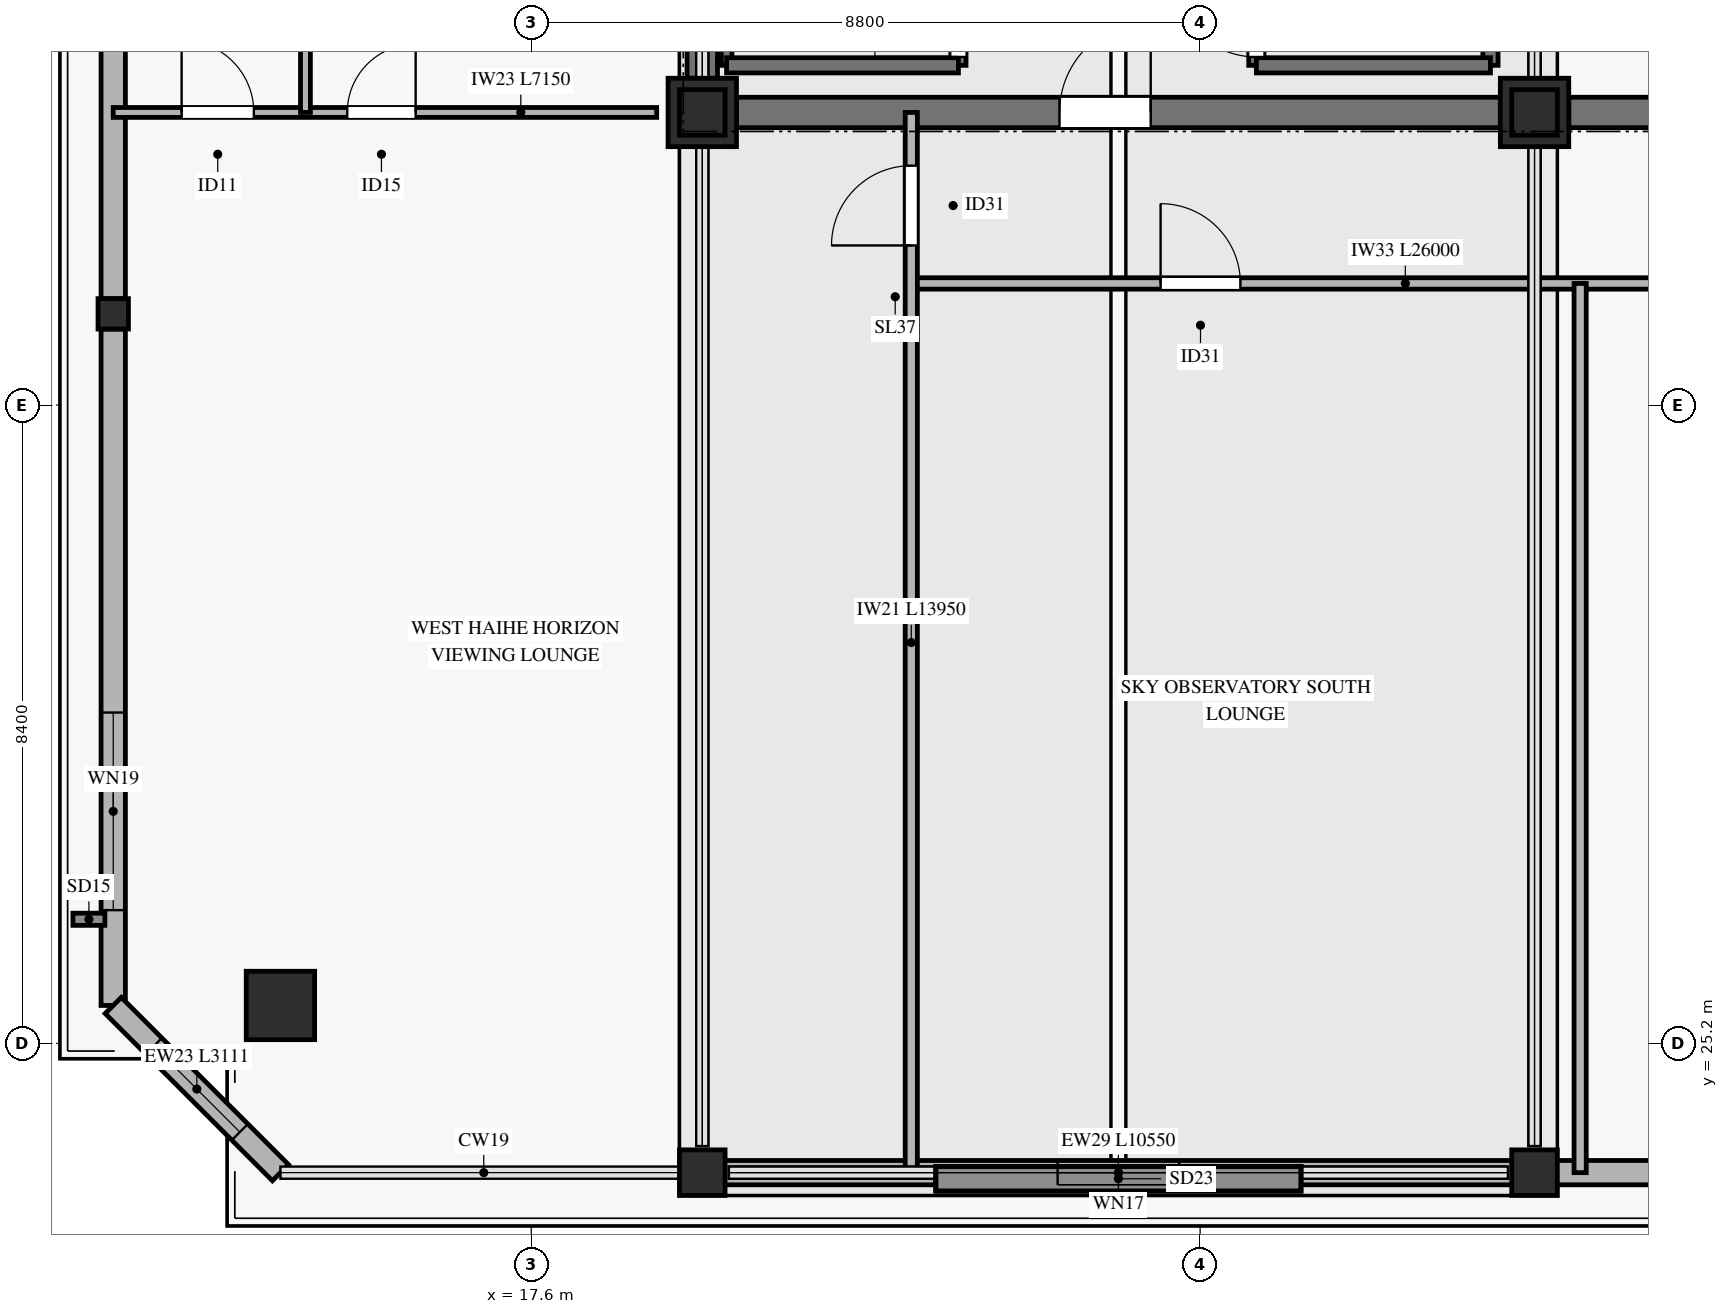
"""IFC4 building model, lengths in metres.
Left out: names, types, materials, properties, quantities, classifications, styles, units other than length and angle.
Written with IfcOpenShell. Run it as: python <this file> out.ifc"""

import sys

from ifc_helpers import new_model, si_unit, direction, frame, frame_2d, origin, origin_2d, place, context, subcontext, project, spatial, rectangle, hollow_rectangle, extrude, source, transform, mapped, element, fill, save


model = new_model("IFC4")
c1 = context("Model", 3, precision=1e-05, world=origin(), true_north=direction((0.0, 1.0)))
c2 = subcontext(c1, "Body", "Model", "MODEL_VIEW")
j1 = project(units=[si_unit("LENGTHUNIT", "METRE"), si_unit("PLANEANGLEUNIT", "RADIAN")], contexts=[c1])
p1 = place(None, origin())
s1 = spatial("IfcSite", under=j1, at=p1, CompositionType="ELEMENT")
p2 = place(p1, origin())
s2 = spatial("IfcBuilding", under=s1, at=p2, CompositionType="ELEMENT")
p3 = place(p2, frame((0.0, 0.0, 352.7)))
s3 = spatial("IfcBuildingStorey", under=s2, at=p3, CompositionType="ELEMENT", Elevation=352.7)
m1 = source(origin(), c2, "Body", "SweptSolid", [
    extrude(rectangle(XDim=0.9, YDim=0.9, at=origin_2d()), origin(), (0.0, 0.0, 1.0), 6.16),
])
for number, where, z_axis, x_axis in (
    (1, (19.85, 37.45, 0.0), (0.0, 0.0, 1.0), (1.0, 0.0, 0.0)),
    (2, (30.8, 37.45, 0.0), (0.0, 0.0, 1.0), (1.0, 0.0, 0.0)),
):
    element("IfcColumn", number, at=place(p3, frame(where, z_axis=z_axis, x_axis=x_axis)), inside=s3, PredefinedType="PILASTER", context=c2, shape_type="MappedRepresentation", body=[
        mapped(m1, transform((0.0, 0.0, 0.0), x_axis=(1.0, 0.0, 0.0), y_axis=(0.0, 1.0, 0.0), z_axis=(0.0, 0.0, 1.0), scale=1.0)),
    ])
p4 = place(p3, frame((20.3, 37.45, 0.0), z_axis=(0.0, 0.0, 1.0), x_axis=(1.0, 0.0, 0.0)))
e3 = element("IfcWall", 3, at=p4, inside=s3, PredefinedType="SHEAR", context=c2, shape_type="SweptSolid", body=[
    extrude(rectangle(XDim=10.05, YDim=0.4, at=frame_2d((5.025, 0.0))), origin(), (0.0, 0.0, 1.0), 6.16),
])
p5 = place(p4, frame((4.25, 0.0, 0.0)))
e4 = element("IfcOpeningElement", 4, at=p5, cuts=e3, PredefinedType="OPENING", context=c2, shape_type="SweptSolid", body=[
    extrude(rectangle(XDim=1.2, YDim=2.15, at=frame_2d((0.6, 1.075))), frame((0.0, 0.21, 0.0), z_axis=(0.0, -1.0, 0.0), x_axis=(1.0, 0.0, 0.0)), (0.0, 0.0, 1.0), 0.42),
])
p6 = place(p3, frame((31.25, 37.45, 0.0), z_axis=(0.0, 0.0, 1.0), x_axis=(1.0, 0.0, 0.0)))
e5 = element("IfcWall", 5, at=p6, inside=s3, PredefinedType="SHEAR", context=c2, shape_type="SweptSolid", body=[
    extrude(rectangle(XDim=1.9, YDim=0.4, at=frame_2d((0.95, 0.0))), origin(), (0.0, 0.0, 1.0), 6.16),
])
p7 = place(p3, frame((19.85, 37.9, 0.0), z_axis=(0.0, 0.0, 1.0), x_axis=(0.0, 1.0, 0.0)))
e6 = element("IfcWall", 6, at=p7, inside=s3, PredefinedType="SHEAR", context=c2, shape_type="SweptSolid", body=[
    extrude(rectangle(XDim=8.2, YDim=0.4, at=frame_2d((4.1, 0.0))), origin(), (0.0, 0.0, 1.0), 6.16),
])
m2 = source(origin(), c2, "Body", "SweptSolid", [
    extrude(hollow_rectangle(XDim=0.9, YDim=0.9, WallThickness=0.04, at=origin_2d()), origin(), (0.0, 0.0, 1.0), 6.16),
])
p8 = place(p3, frame((14.3, 25.7, 0.0), z_axis=(0.0, 0.0, 1.0), x_axis=(1.0, 0.0, 0.0)))
e7 = element("IfcColumn", 7, at=p8, inside=s3, PredefinedType="COLUMN", context=c2, shape_type="MappedRepresentation", body=[
    mapped(m2, transform((0.0, 0.0, 0.0), x_axis=(1.0, 0.0, 0.0), y_axis=(0.0, 1.0, 0.0), z_axis=(0.0, 0.0, 1.0), scale=1.0)),
])
m3 = source(origin(), c2, "Body", "SweptSolid", [
    extrude(hollow_rectangle(XDim=0.4, YDim=0.4, WallThickness=0.02, at=origin_2d()), origin(), (0.0, 0.0, 1.0), 6.16),
])
for number, where, z_axis, x_axis in (
    (8, (19.85, 23.5, 0.0), (0.0, 0.0, 1.0), (1.0, 0.0, 0.0)),
    (9, (30.8, 23.5, 0.0), (0.0, 0.0, 1.0), (1.0, 0.0, 0.0)),
    (10, (12.1, 34.8, 0.0), (0.0, 0.0, 1.0), (1.0, 0.0, 0.0)),
):
    element("IfcColumn", number, at=place(p3, frame(where, z_axis=z_axis, x_axis=x_axis)), inside=s3, PredefinedType="COLUMN", context=c2, shape_type="MappedRepresentation", body=[
        mapped(m3, transform((0.0, 0.0, 0.0), x_axis=(1.0, 0.0, 0.0), y_axis=(0.0, 1.0, 0.0), z_axis=(0.0, 0.0, 1.0), scale=1.0)),
    ])
m4 = source(origin(), c2, "Body", "SweptSolid", [
    extrude(hollow_rectangle(XDim=0.6, YDim=0.6, WallThickness=0.028, at=origin_2d()), origin(), (0.0, 0.0, 1.0), 21.147),
])
for number, where, z_axis, x_axis in (
    (11, (19.85, 23.5, 6.4), (0.0, 0.0, 1.0), (1.0, 0.0, 0.0)),
    (12, (30.8, 23.5, 6.4), (0.0, 0.0, 1.0), (1.0, 0.0, 0.0)),
    (13, (30.8, 37.45, 6.4), (0.0, 0.0, 1.0), (1.0, 0.0, 0.0)),
    (14, (19.85, 37.45, 6.4), (0.0, 0.0, 1.0), (1.0, 0.0, 0.0)),
):
    element("IfcColumn", number, at=place(p3, frame(where, z_axis=z_axis, x_axis=x_axis)), inside=s3, PredefinedType="COLUMN", context=c2, shape_type="MappedRepresentation", body=[
        mapped(m4, transform((0.0, 0.0, 0.0), x_axis=(1.0, 0.0, 0.0), y_axis=(0.0, 1.0, 0.0), z_axis=(0.0, 0.0, 1.0), scale=1.0)),
    ])
p9 = place(p3, frame((20.05, 23.5, 0.0), z_axis=(0.0, 0.0, 1.0), x_axis=(1.0, 0.0, 0.0)))
e15 = element("IfcWall", 15, at=p9, inside=s3, PredefinedType="SOLIDWALL", context=c2, shape_type="SweptSolid", body=[
    extrude(rectangle(XDim=10.55, YDim=0.32, at=frame_2d((5.275, 0.0))), origin(), (0.0, 0.0, 1.0), 5.79),
])
p10 = place(p9, frame((4.475, 0.0, 0.45)))
e16 = element("IfcOpeningElement", 16, at=p10, cuts=e15, PredefinedType="OPENING", context=c2, shape_type="SweptSolid", body=[
    extrude(rectangle(XDim=1.6, YDim=2.0, at=frame_2d((0.8, 1.0))), frame((0.0, 0.17, 0.0), z_axis=(0.0, -1.0, 0.0), x_axis=(1.0, 0.0, 0.0)), (0.0, 0.0, 1.0), 0.34),
])
p11 = place(p3, frame((31.0, 23.5, 0.0), z_axis=(0.0, 0.0, 1.0), x_axis=(1.0, 0.0, 0.0)))
e17 = element("IfcWall", 17, at=p11, inside=s3, PredefinedType="SOLIDWALL", context=c2, shape_type="SweptSolid", body=[
    extrude(rectangle(XDim=6.35, YDim=0.32, at=frame_2d((3.175, 0.0))), origin(), (0.0, 0.0, 1.0), 3.535),
])
p12 = place(p3, frame((12.1, 25.7, 0.0), z_axis=(0.0, 0.0, 1.0), x_axis=(0.0, 1.0, 0.0)))
e18 = element("IfcWall", 18, at=p12, inside=s3, PredefinedType="SOLIDWALL", context=c2, shape_type="SweptSolid", body=[
    extrude(rectangle(XDim=8.9, YDim=0.32, at=frame_2d((4.45, 0.0))), origin(), (0.0, 0.0, 1.0), 5.79),
])
p13 = place(p12, frame((1.254, 0.0, 0.45)))
e19 = element("IfcOpeningElement", 19, at=p13, cuts=e18, PredefinedType="OPENING", context=c2, shape_type="SweptSolid", body=[
    extrude(rectangle(XDim=2.6, YDim=2.4, at=frame_2d((1.3, 1.2))), frame((0.0, 0.17, 0.0), z_axis=(0.0, -1.0, 0.0), x_axis=(1.0, 0.0, 0.0)), (0.0, 0.0, 1.0), 0.34),
])
p14 = place(p3, frame((12.1, 35.0, 0.0), z_axis=(0.0, 0.0, 1.0), x_axis=(0.0, 1.0, 0.0)))
e20 = element("IfcWall", 20, at=p14, inside=s3, PredefinedType="SOLIDWALL", context=c2, shape_type="SweptSolid", body=[
    extrude(rectangle(XDim=8.9, YDim=0.32, at=frame_2d((4.45, 0.0))), origin(), (0.0, 0.0, 1.0), 5.79),
])
p15 = place(p3, frame((12.1, 25.7, 0.0), z_axis=(0.0, 0.0, 1.0), x_axis=(0.707106781187, -0.707106781187, 0.0)))
e21 = element("IfcWall", 21, at=p15, inside=s3, PredefinedType="SOLIDWALL", context=c2, shape_type="SweptSolid", body=[
    extrude(rectangle(XDim=3.111, YDim=0.3, at=frame_2d((1.556, 0.0))), origin(), (0.0, 0.0, 1.0), 5.79),
])
p16 = place(p15, frame((0.756, 0.0, 0.45)))
e22 = element("IfcOpeningElement", 22, at=p16, cuts=e21, PredefinedType="OPENING", context=c2, shape_type="SweptSolid", body=[
    extrude(rectangle(XDim=1.6, YDim=2.0, at=frame_2d((0.8, 1.0))), frame((0.0, 0.16, 0.0), z_axis=(0.0, -1.0, 0.0), x_axis=(1.0, 0.0, 0.0)), (0.0, 0.0, 1.0), 0.32),
])
p17 = place(p3, frame((20.17, 38.07, 0.0), z_axis=(0.0, 0.0, 1.0), x_axis=(0.0, 1.0, 0.0)))
e23 = element("IfcWall", 23, at=p17, inside=s3, PredefinedType="SOLIDWALL", context=c2, shape_type="SweptSolid", body=[
    extrude(rectangle(XDim=7.25, YDim=0.14, at=frame_2d((3.625, 0.0))), origin(), (0.0, 0.0, 1.0), 6.4),
])
p18 = place(p3, frame((23.22, 38.07, 0.0), z_axis=(0.0, 0.0, 1.0), x_axis=(0.0, 1.0, 0.0)))
e24 = element("IfcWall", 24, at=p18, inside=s3, PredefinedType="SOLIDWALL", context=c2, shape_type="SweptSolid", body=[
    extrude(rectangle(XDim=7.25, YDim=0.2, at=frame_2d((3.625, 0.0))), origin(), (0.0, 0.0, 1.0), 6.4),
])
p19 = place(p18, frame((0.11, 0.0, 0.0)))
e25 = element("IfcOpeningElement", 25, at=p19, cuts=e24, PredefinedType="OPENING", context=c2, shape_type="SweptSolid", body=[
    extrude(rectangle(XDim=1.1, YDim=2.15, at=frame_2d((0.55, 1.075))), frame((0.0, 0.11, 0.0), z_axis=(0.0, -1.0, 0.0), x_axis=(1.0, 0.0, 0.0)), (0.0, 0.0, 1.0), 0.22),
])
p20 = place(p3, frame((20.17, 38.07, 0.0), z_axis=(0.0, 0.0, 1.0), x_axis=(1.0, 0.0, 0.0)))
e26 = element("IfcWall", 26, at=p20, inside=s3, PredefinedType="SOLIDWALL", context=c2, shape_type="SweptSolid", body=[
    extrude(rectangle(XDim=3.05, YDim=0.2, at=frame_2d((1.525, 0.0))), origin(), (0.0, 0.0, 1.0), 6.4),
])
p21 = place(p3, frame((27.14, 38.07, 0.0), z_axis=(0.0, 0.0, 1.0), x_axis=(0.0, 1.0, 0.0)))
e27 = element("IfcWall", 27, at=p21, inside=s3, PredefinedType="SOLIDWALL", context=c2, shape_type="SweptSolid", body=[
    extrude(rectangle(XDim=7.25, YDim=0.2, at=frame_2d((3.625, 0.0))), origin(), (0.0, 0.0, 1.0), 6.4),
])
p22 = place(p21, frame((0.11, 0.0, 0.0)))
e28 = element("IfcOpeningElement", 28, at=p22, cuts=e27, PredefinedType="OPENING", context=c2, shape_type="SweptSolid", body=[
    extrude(rectangle(XDim=1.1, YDim=2.15, at=frame_2d((0.55, 1.075))), frame((0.0, 0.11, 0.0), z_axis=(0.0, -1.0, 0.0), x_axis=(1.0, 0.0, 0.0)), (0.0, 0.0, 1.0), 0.22),
])
p23 = place(p3, frame((30.22, 38.07, 0.0), z_axis=(0.0, 0.0, 1.0), x_axis=(0.0, 1.0, 0.0)))
e29 = element("IfcWall", 29, at=p23, inside=s3, PredefinedType="SOLIDWALL", context=c2, shape_type="SweptSolid", body=[
    extrude(rectangle(XDim=7.25, YDim=0.2, at=frame_2d((3.625, 0.0))), origin(), (0.0, 0.0, 1.0), 6.4),
])
p24 = place(p3, frame((27.14, 38.07, 0.0), z_axis=(0.0, 0.0, 1.0), x_axis=(1.0, 0.0, 0.0)))
e30 = element("IfcWall", 30, at=p24, inside=s3, PredefinedType="SOLIDWALL", context=c2, shape_type="SweptSolid", body=[
    extrude(rectangle(XDim=3.08, YDim=0.2, at=frame_2d((1.54, 0.0))), origin(), (0.0, 0.0, 1.0), 6.4),
])
p25 = place(p3, frame((22.6, 35.2, 0.0), z_axis=(0.0, 0.0, 1.0), x_axis=(1.0, 0.0, 0.0)))
e31 = element("IfcWall", 31, at=p25, inside=s3, PredefinedType="PARTITIONING", context=c2, shape_type="SweptSolid", body=[
    extrude(rectangle(XDim=26.0, YDim=0.15, at=frame_2d((13.0, 0.0))), origin(), (0.0, 0.0, 1.0), 3.535),
])
p26 = place(p25, frame((3.28, 0.0, 0.0)))
e32 = element("IfcOpeningElement", 32, at=p26, cuts=e31, PredefinedType="OPENING", context=c2, shape_type="SweptSolid", body=[
    extrude(rectangle(XDim=1.05, YDim=2.15, at=frame_2d((0.525, 1.075))), frame((0.0, 0.085, 0.0), z_axis=(0.0, -1.0, 0.0), x_axis=(1.0, 0.0, 0.0)), (0.0, 0.0, 1.0), 0.17),
])
p27 = place(p25, frame((11.94, 0.0, 0.0)))
e33 = element("IfcOpeningElement", 33, at=p27, cuts=e31, PredefinedType="OPENING", context=c2, shape_type="SweptSolid", body=[
    extrude(rectangle(XDim=1.05, YDim=2.15, at=frame_2d((0.525, 1.075))), frame((0.0, 0.085, 0.0), z_axis=(0.0, -1.0, 0.0), x_axis=(1.0, 0.0, 0.0)), (0.0, 0.0, 1.0), 0.17),
])
p28 = place(p25, frame((19.08, 0.0, 0.0)))
e34 = element("IfcOpeningElement", 34, at=p28, cuts=e31, PredefinedType="OPENING", context=c2, shape_type="SweptSolid", body=[
    extrude(rectangle(XDim=1.05, YDim=2.15, at=frame_2d((0.525, 1.075))), frame((0.0, 0.085, 0.0), z_axis=(0.0, -1.0, 0.0), x_axis=(1.0, 0.0, 0.0)), (0.0, 0.0, 1.0), 0.17),
])
p29 = place(p25, frame((23.6, 0.0, 0.0)))
e35 = element("IfcOpeningElement", 35, at=p29, cuts=e31, PredefinedType="OPENING", context=c2, shape_type="SweptSolid", body=[
    extrude(rectangle(XDim=1.05, YDim=2.15, at=frame_2d((0.525, 1.075))), frame((0.0, 0.085, 0.0), z_axis=(0.0, -1.0, 0.0), x_axis=(1.0, 0.0, 0.0)), (0.0, 0.0, 1.0), 0.17),
])
p30 = place(p3, frame((22.6, 23.5, 0.0), z_axis=(0.0, 0.0, 1.0), x_axis=(0.0, 1.0, 0.0)))
e36 = element("IfcWall", 36, at=p30, inside=s3, PredefinedType="PARTITIONING", context=c2, shape_type="SweptSolid", body=[
    extrude(rectangle(XDim=13.95, YDim=0.16, at=frame_2d((6.975, 0.0))), origin(), (0.0, 0.0, 1.0), 5.745),
])
p31 = place(p30, frame((12.2, 0.0, 0.0)))
e37 = element("IfcOpeningElement", 37, at=p31, cuts=e36, PredefinedType="OPENING", context=c2, shape_type="SweptSolid", body=[
    extrude(rectangle(XDim=1.05, YDim=2.15, at=frame_2d((0.525, 1.075))), frame((0.0, 0.09, 0.0), z_axis=(0.0, -1.0, 0.0), x_axis=(1.0, 0.0, 0.0)), (0.0, 0.0, 1.0), 0.18),
])
p32 = place(p3, frame((31.4, 23.5, 0.0), z_axis=(0.0, 0.0, 1.0), x_axis=(0.0, 1.0, 0.0)))
e38 = element("IfcWall", 38, at=p32, inside=s3, PredefinedType="PARTITIONING", context=c2, shape_type="SweptSolid", body=[
    extrude(rectangle(XDim=11.7, YDim=0.16, at=frame_2d((5.85, 0.0))), origin(), (0.0, 0.0, 1.0), 3.535),
])
p33 = place(p3, frame((12.1, 37.45, 0.0), z_axis=(0.0, 0.0, 1.0), x_axis=(1.0, 0.0, 0.0)))
e39 = element("IfcWall", 39, at=p33, inside=s3, PredefinedType="PARTITIONING", context=c2, shape_type="SweptSolid", body=[
    extrude(rectangle(XDim=7.15, YDim=0.13, at=frame_2d((3.575, 0.0))), origin(), (0.0, 0.0, 1.0), 5.795),
])
p34 = place(p33, frame((0.9, 0.0, 0.0)))
e40 = element("IfcOpeningElement", 40, at=p34, cuts=e39, PredefinedType="OPENING", context=c2, shape_type="SweptSolid", body=[
    extrude(rectangle(XDim=0.95, YDim=2.1, at=frame_2d((0.475, 1.05))), frame((0.0, 0.075, 0.0), z_axis=(0.0, -1.0, 0.0), x_axis=(1.0, 0.0, 0.0)), (0.0, 0.0, 1.0), 0.15),
])
p35 = place(p33, frame((3.079, 0.0, 0.0)))
e41 = element("IfcOpeningElement", 41, at=p35, cuts=e39, PredefinedType="OPENING", context=c2, shape_type="SweptSolid", body=[
    extrude(rectangle(XDim=0.9, YDim=2.1, at=frame_2d((0.45, 1.05))), frame((0.0, 0.075, 0.0), z_axis=(0.0, -1.0, 0.0), x_axis=(1.0, 0.0, 0.0)), (0.0, 0.0, 1.0), 0.15),
])
p36 = place(p3, frame((14.629, 37.45, 0.0), z_axis=(0.0, 0.0, 1.0), x_axis=(0.0, 1.0, 0.0)))
e42 = element("IfcWall", 42, at=p36, inside=s3, PredefinedType="PARTITIONING", context=c2, shape_type="SweptSolid", body=[
    extrude(rectangle(XDim=8.8, YDim=0.13, at=frame_2d((4.4, 0.0))), origin(), (0.0, 0.0, 1.0), 5.795),
])
m5 = source(origin(), c2, "Body", "SweptSolid", [
    extrude(rectangle(XDim=1.6, YDim=2.0, at=frame_2d((0.8, 1.0))), frame((0.0, 0.03, 0.0), z_axis=(0.0, -1.0, 0.0), x_axis=(1.0, 0.0, 0.0)), (0.0, 0.0, 1.0), 0.06),
])
p37 = place(p10, origin())
e43 = element("IfcWindow", 43, at=p37, inside=s3, PartitioningType="SINGLE_PANEL", PredefinedType="WINDOW", context=c2, shape_type="MappedRepresentation", body=[
    mapped(m5, transform((0.0, 0.0, 0.0), x_axis=(1.0, 0.0, 0.0), y_axis=(0.0, 1.0, 0.0), z_axis=(0.0, 0.0, 1.0), scale=1.0)),
])
fill(e16, e43)
m6 = source(origin(), c2, "Body", "SweptSolid", [
    extrude(rectangle(XDim=2.6, YDim=2.4, at=frame_2d((1.3, 1.2))), frame((0.0, 0.03, 0.0), z_axis=(0.0, -1.0, 0.0), x_axis=(1.0, 0.0, 0.0)), (0.0, 0.0, 1.0), 0.06),
])
p38 = place(p13, origin())
e44 = element("IfcWindow", 44, at=p38, inside=s3, PartitioningType="SINGLE_PANEL", PredefinedType="WINDOW", context=c2, shape_type="MappedRepresentation", body=[
    mapped(m6, transform((0.0, 0.0, 0.0), x_axis=(1.0, 0.0, 0.0), y_axis=(0.0, 1.0, 0.0), z_axis=(0.0, 0.0, 1.0), scale=1.0)),
])
fill(e19, e44)
p39 = place(p16, origin())
e45 = element("IfcWindow", 45, at=p39, inside=s3, PartitioningType="SINGLE_PANEL", PredefinedType="WINDOW", context=c2, shape_type="MappedRepresentation", body=[
    mapped(m5, transform((0.0, 0.0, 0.0), x_axis=(1.0, 0.0, 0.0), y_axis=(0.0, 1.0, 0.0), z_axis=(0.0, 0.0, 1.0), scale=1.0)),
])
fill(e22, e45)
m7 = source(origin(), c2, "Body", "SweptSolid", [
    extrude(rectangle(XDim=1.1, YDim=2.15, at=frame_2d((0.55, 1.075))), frame((0.0, 0.025, 0.0), z_axis=(0.0, -1.0, 0.0), x_axis=(1.0, 0.0, 0.0)), (0.0, 0.0, 1.0), 0.05),
])
p40 = place(p19, origin())
e46 = element("IfcDoor", 46, at=p40, inside=s3, OperationType="SINGLE_SWING_LEFT", PredefinedType="DOOR", context=c2, shape_type="MappedRepresentation", body=[
    mapped(m7, transform((0.0, 0.0, 0.0), x_axis=(1.0, 0.0, 0.0), y_axis=(0.0, 1.0, 0.0), z_axis=(0.0, 0.0, 1.0), scale=1.0)),
])
fill(e25, e46)
p41 = place(p22, origin())
e47 = element("IfcDoor", 47, at=p41, inside=s3, OperationType="SINGLE_SWING_RIGHT", PredefinedType="DOOR", context=c2, shape_type="MappedRepresentation", body=[
    mapped(m7, transform((0.0, 0.0, 0.0), x_axis=(1.0, 0.0, 0.0), y_axis=(0.0, 1.0, 0.0), z_axis=(0.0, 0.0, 1.0), scale=1.0)),
])
fill(e28, e47)
m8 = source(origin(), c2, "Body", "SweptSolid", [
    extrude(rectangle(XDim=1.2, YDim=2.15, at=frame_2d((0.6, 1.075))), frame((0.0, 0.025, 0.0), z_axis=(0.0, -1.0, 0.0), x_axis=(1.0, 0.0, 0.0)), (0.0, 0.0, 1.0), 0.05),
])
p42 = place(p5, origin())
e48 = element("IfcDoor", 48, at=p42, inside=s3, OperationType="SINGLE_SWING_RIGHT", PredefinedType="DOOR", context=c2, shape_type="MappedRepresentation", body=[
    mapped(m8, transform((0.0, 0.0, 0.0), x_axis=(1.0, 0.0, 0.0), y_axis=(0.0, 1.0, 0.0), z_axis=(0.0, 0.0, 1.0), scale=1.0)),
])
fill(e4, e48)
m9 = source(origin(), c2, "Body", "SweptSolid", [
    extrude(rectangle(XDim=1.05, YDim=2.15, at=frame_2d((0.525, 1.075))), frame((0.0, 0.025, 0.0), z_axis=(0.0, -1.0, 0.0), x_axis=(1.0, 0.0, 0.0)), (0.0, 0.0, 1.0), 0.05),
])
p43 = place(p31, origin())
e49 = element("IfcDoor", 49, at=p43, inside=s3, OperationType="SINGLE_SWING_LEFT", PredefinedType="DOOR", context=c2, shape_type="MappedRepresentation", body=[
    mapped(m9, transform((0.0, 0.0, 0.0), x_axis=(1.0, 0.0, 0.0), y_axis=(0.0, 1.0, 0.0), z_axis=(0.0, 0.0, 1.0), scale=1.0)),
])
fill(e37, e49)
p44 = place(p26, origin())
e50 = element("IfcDoor", 50, at=p44, inside=s3, OperationType="SINGLE_SWING_LEFT", PredefinedType="DOOR", context=c2, shape_type="MappedRepresentation", body=[
    mapped(m9, transform((0.0, 0.0, 0.0), x_axis=(1.0, 0.0, 0.0), y_axis=(0.0, 1.0, 0.0), z_axis=(0.0, 0.0, 1.0), scale=1.0)),
])
fill(e32, e50)
m10 = source(origin(), c2, "Body", "SweptSolid", [
    extrude(rectangle(XDim=0.95, YDim=2.1, at=frame_2d((0.475, 1.05))), frame((0.0, 0.025, 0.0), z_axis=(0.0, -1.0, 0.0), x_axis=(1.0, 0.0, 0.0)), (0.0, 0.0, 1.0), 0.05),
])
p45 = place(p34, origin())
e51 = element("IfcDoor", 51, at=p45, inside=s3, OperationType="SINGLE_SWING_LEFT", PredefinedType="DOOR", context=c2, shape_type="MappedRepresentation", body=[
    mapped(m10, transform((0.0, 0.0, 0.0), x_axis=(1.0, 0.0, 0.0), y_axis=(0.0, 1.0, 0.0), z_axis=(0.0, 0.0, 1.0), scale=1.0)),
])
fill(e40, e51)
m11 = source(origin(), c2, "Body", "SweptSolid", [
    extrude(rectangle(XDim=0.9, YDim=2.1, at=frame_2d((0.45, 1.05))), frame((0.0, 0.025, 0.0), z_axis=(0.0, -1.0, 0.0), x_axis=(1.0, 0.0, 0.0)), (0.0, 0.0, 1.0), 0.05),
])
p46 = place(p35, origin())
e52 = element("IfcDoor", 52, at=p46, inside=s3, OperationType="SINGLE_SWING_RIGHT", PredefinedType="DOOR", context=c2, shape_type="MappedRepresentation", body=[
    mapped(m11, transform((0.0, 0.0, 0.0), x_axis=(1.0, 0.0, 0.0), y_axis=(0.0, 1.0, 0.0), z_axis=(0.0, 0.0, 1.0), scale=1.0)),
])
fill(e41, e52)
save(model, sys.argv[1])
